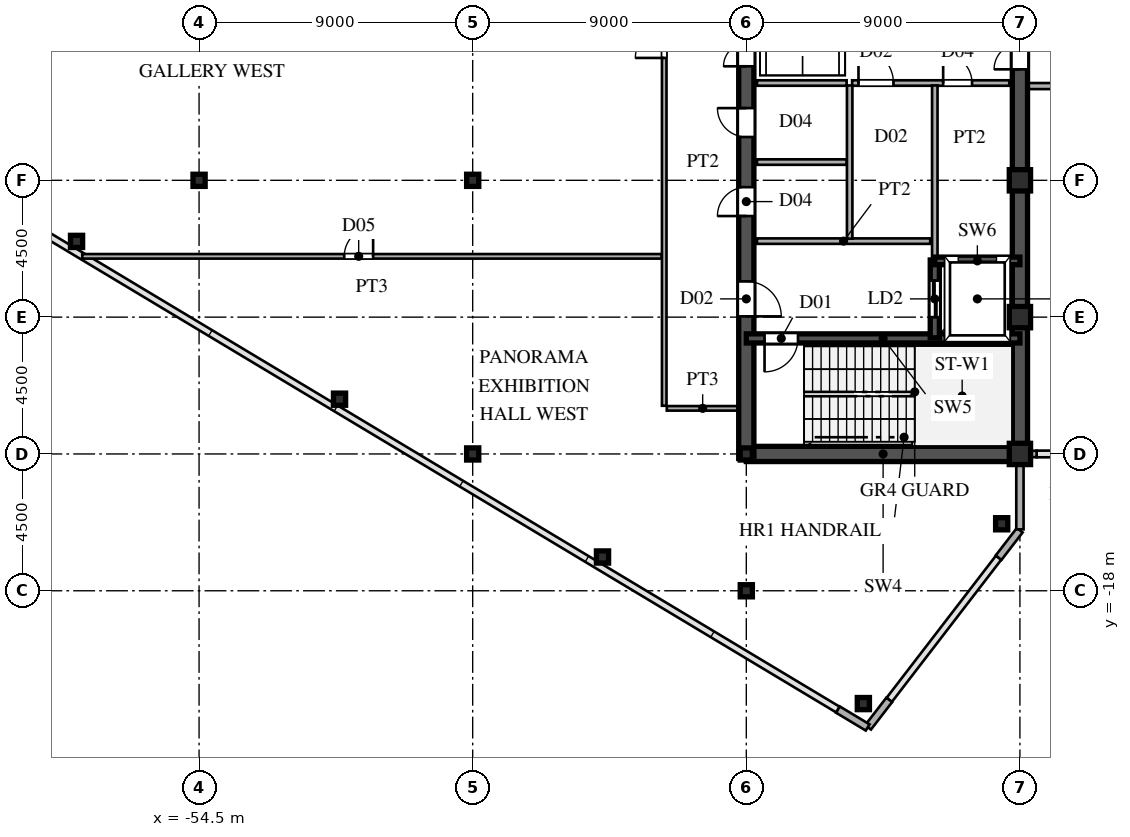
"""IFC4 building model, lengths in metres.
Left out: names, types, materials, properties, quantities, classifications, styles, units other than length and angle.
Written with IfcOpenShell. Run it as: python <this file> out.ifc"""

import sys

from ifc_helpers import new_model, si_unit, direction, frame, frame_2d, origin, origin_2d, place, context, subcontext, project, spatial, rectangle, hollow_rectangle, i_section, extrude, source, transform, mapped, element, fill, save


model = new_model("IFC4")
c1 = context("Model", 3, precision=1e-05, world=origin(), true_north=direction((0.0, 1.0)))
c2 = subcontext(c1, "Body", "Model", "MODEL_VIEW")
j1 = project(units=[si_unit("LENGTHUNIT", "METRE"), si_unit("PLANEANGLEUNIT", "RADIAN")], contexts=[c1])
p1 = place(None, origin())
s1 = spatial("IfcSite", under=j1, at=p1, CompositionType="ELEMENT")
p2 = place(p1, origin())
s2 = spatial("IfcBuilding", under=s1, at=p2, CompositionType="ELEMENT")
p3 = place(p2, frame((0.0, 0.0, 269.4)))
s3 = spatial("IfcBuildingStorey", under=s2, at=p3, CompositionType="ELEMENT", Elevation=269.4)
m1 = source(origin(), c2, "Body", "SweptSolid", [
    extrude(hollow_rectangle(XDim=0.7, YDim=0.7, WallThickness=0.03, at=origin_2d()), origin(), (0.0, 0.0, 1.0), 4.8),
])
for number, where, z_axis, x_axis in (
    (1, (-27.5, -13.5, 0.0), (0.0, 0.0, 1.0), (1.0, 0.0, 0.0)),
    (2, (-27.5, -9.0, 0.0), (0.0, 0.0, 1.0), (1.0, 0.0, 0.0)),
    (3, (-27.5, -4.5, 0.0), (0.0, 0.0, 1.0), (1.0, 0.0, 0.0)),
):
    element("IfcColumn", number, at=place(p3, frame(where, z_axis=z_axis, x_axis=x_axis)), inside=s3, PredefinedType="COLUMN", context=c2, shape_type="MappedRepresentation", body=[
        mapped(m1, transform((0.0, 0.0, 0.0), scale=1.0)),
    ])
m2 = source(origin(), c2, "Body", "SweptSolid", [
    extrude(i_section(OverallWidth=0.4, OverallDepth=0.4, WebThickness=0.013, FlangeThickness=0.021, at=origin_2d()), origin(), (0.0, 0.0, 1.0), 4.8),
])
for number, where, z_axis, x_axis in (
    (4, (-36.5, -18.0, 0.0), (0.0, 0.0, 1.0), (1.0, 0.0, 0.0)),
    (5, (-36.5, -13.5, 0.0), (0.0, 0.0, 1.0), (1.0, 0.0, 0.0)),
    (6, (-45.5, -13.5, 0.0), (0.0, 0.0, 1.0), (1.0, 0.0, 0.0)),
    (7, (-45.5, -4.5, 0.0), (0.0, 0.0, 1.0), (1.0, 0.0, 0.0)),
    (8, (-54.5, -4.5, 0.0), (0.0, 0.0, 1.0), (1.0, 0.0, 0.0)),
):
    element("IfcColumn", number, at=place(p3, frame(where, z_axis=z_axis, x_axis=x_axis)), inside=s3, PredefinedType="COLUMN", context=c2, shape_type="MappedRepresentation", body=[
        mapped(m2, transform((0.0, 0.0, 0.0), scale=1.0)),
    ])
m3 = source(origin(), c2, "Body", "SweptSolid", [
    extrude(hollow_rectangle(XDim=0.4, YDim=0.4, WallThickness=0.016, at=origin_2d()), origin(), (0.0, 0.0, 1.0), 4.8),
])
for number, where, z_axis, x_axis in (
    (9, (-28.1, -15.796, 0.0), (0.0, 0.0, 1.0), (1.0, 0.0, 0.0)),
    (10, (-32.65, -21.71, 0.0), (0.0, 0.0, 1.0), (1.0, 0.0, 0.0)),
    (11, (-41.23, -16.889, 0.0), (0.0, 0.0, 1.0), (1.0, 0.0, 0.0)),
    (12, (-49.88, -11.699, 0.0), (0.0, 0.0, 1.0), (1.0, 0.0, 0.0)),
    (13, (-58.53, -6.509, 0.0), (0.0, 0.0, 1.0), (1.0, 0.0, 0.0)),
):
    element("IfcColumn", number, at=place(p3, frame(where, z_axis=z_axis, x_axis=x_axis)), inside=s3, PredefinedType="COLUMN", context=c2, shape_type="MappedRepresentation", body=[
        mapped(m3, transform((0.0, 0.0, 0.0), scale=1.0)),
    ])
p4 = place(p3, frame((-27.5, -15.98, 0.0), z_axis=(0.0, 0.0, 1.0), x_axis=(0.0, 1.0, 0.0)))
e14 = element("IfcWall", 14, at=p4, inside=s3, PredefinedType="SOLIDWALL", context=c2, shape_type="SweptSolid", body=[
    extrude(rectangle(XDim=1.605, YDim=0.24, at=frame_2d((0.803, 0.0))), origin(), (0.0, 0.0, 1.0), 4.54),
])
p5 = place(p3, frame((-27.5, -14.375, 0.0), z_axis=(0.0, 0.0, 1.0), x_axis=(0.0, 1.0, 0.0)))
e15 = element("IfcWall", 15, at=p5, inside=s3, PredefinedType="SOLIDWALL", context=c2, shape_type="SweptSolid", body=[
    extrude(rectangle(XDim=0.62, YDim=0.24, at=frame_2d((0.31, 0.0))), origin(), (0.0, 0.0, 1.0), 4.04),
])
for number, where, z_axis, x_axis in (
    (16, (-33.486, -21.908, 0.0), (0.0, 0.0, 1.0), (0.857, -0.515, 0.0)),
    (17, (-32.494, -22.492, 0.0), (0.0, 0.0, 1.0), (0.61, 0.793, 0.0)),
    (18, (-28.201, -16.912, 0.0), (0.0, 0.0, 1.0), (0.61, 0.793, 0.0)),
):
    element("IfcWall", number, at=place(p3, frame(where, z_axis=z_axis, x_axis=x_axis)), inside=s3, PredefinedType="SOLIDWALL", context=c2, shape_type="SweptSolid", body=[
        extrude(rectangle(XDim=1.14, YDim=0.24, at=frame_2d((0.57, 0.0))), origin(), (0.0, 0.0, 1.0), 4.54),
    ])
p6 = place(p3, frame((-27.49, -13.5, 0.0), z_axis=(0.0, 0.0, 1.0), x_axis=(1.0, 0.0, 0.0)))
e19 = element("IfcWall", 19, at=p6, inside=s3, PredefinedType="SOLIDWALL", context=c2, shape_type="SweptSolid", body=[
    extrude(rectangle(XDim=0.54, YDim=0.21, at=frame_2d((0.27, 0.0))), origin(), (0.0, 0.0, 1.0), 4.04),
])
p7 = place(p3, frame((-27.5, -13.5, 0.0), z_axis=(0.0, 0.0, 1.0), x_axis=(0.0, 1.0, 0.0)))
e20 = element("IfcWall", 20, at=p7, inside=s3, PredefinedType="SHEAR", context=c2, shape_type="SweptSolid", body=[
    extrude(rectangle(XDim=12.2, YDim=0.5, at=frame_2d((6.1, 0.0))), origin(), (0.0, 0.0, 1.0), 4.54),
])
p8 = place(p3, frame((-27.5, -1.3, 0.0), z_axis=(0.0, 0.0, 1.0), x_axis=(0.0, 1.0, 0.0)))
e21 = element("IfcWall", 21, at=p8, inside=s3, PredefinedType="SHEAR", context=c2, shape_type="SweptSolid", body=[
    extrude(rectangle(XDim=2.6, YDim=0.5, at=frame_2d((1.3, 0.0))), origin(), (0.0, 0.0, 1.0), 4.54),
])
p9 = place(p8, frame((0.45, 0.0, 0.0)))
e22 = element("IfcOpeningElement", 22, at=p9, cuts=e21, PredefinedType="OPENING", context=c2, shape_type="SweptSolid", body=[
    extrude(rectangle(XDim=1.7, YDim=2.35, at=frame_2d((0.85, 1.175))), frame((0.0, 0.26, 0.0), z_axis=(0.0, -1.0, 0.0), x_axis=(1.0, 0.0, 0.0)), (0.0, 0.0, 1.0), 0.52),
])
p10 = place(p3, frame((-36.5, -13.5, 0.0), z_axis=(0.0, 0.0, 1.0), x_axis=(1.0, 0.0, 0.0)))
e23 = element("IfcWall", 23, at=p10, inside=s3, PredefinedType="SHEAR", context=c2, shape_type="SweptSolid", body=[
    extrude(rectangle(XDim=9.0, YDim=0.5, at=frame_2d((4.5, 0.0))), origin(), (0.0, 0.0, 1.0), 4.54),
])
p11 = place(p3, frame((-36.5, -13.65, 0.0), z_axis=(0.0, 0.0, 1.0), x_axis=(0.0, 1.0, 0.0)))
e24 = element("IfcWall", 24, at=p11, inside=s3, PredefinedType="SHEAR", context=c2, shape_type="SweptSolid", body=[
    extrude(rectangle(XDim=7.15, YDim=0.5, at=frame_2d((3.575, 0.0))), origin(), (0.0, 0.0, 1.0), 4.54),
])
p12 = place(p11, frame((4.675, 0.0, 0.0)))
e25 = element("IfcOpeningElement", 25, at=p12, cuts=e24, PredefinedType="OPENING", context=c2, shape_type="SweptSolid", body=[
    extrude(rectangle(XDim=1.15, YDim=2.2, at=frame_2d((0.575, 1.1))), frame((0.0, 0.26, 0.0), z_axis=(0.0, -1.0, 0.0), x_axis=(1.0, 0.0, 0.0)), (0.0, 0.0, 1.0), 0.52),
])
p13 = place(p3, frame((-36.5, -1.3, 0.0), z_axis=(0.0, 0.0, 1.0), x_axis=(0.0, 1.0, 0.0)))
e26 = element("IfcWall", 26, at=p13, inside=s3, PredefinedType="SHEAR", context=c2, shape_type="SweptSolid", body=[
    extrude(rectangle(XDim=2.6, YDim=0.5, at=frame_2d((1.3, 0.0))), origin(), (0.0, 0.0, 1.0), 4.54),
])
p14 = place(p13, frame((0.55, 0.0, 0.0)))
e27 = element("IfcOpeningElement", 27, at=p14, cuts=e26, PredefinedType="OPENING", context=c2, shape_type="SweptSolid", body=[
    extrude(rectangle(XDim=1.5, YDim=2.3, at=frame_2d((0.75, 1.15))), frame((0.0, 0.26, 0.0), z_axis=(0.0, -1.0, 0.0), x_axis=(1.0, 0.0, 0.0)), (0.0, 0.0, 1.0), 0.52),
])
p15 = place(p3, frame((-36.5, -6.5, 0.0), z_axis=(0.0, 0.0, 1.0), x_axis=(0.0, 1.0, 0.0)))
e28 = element("IfcWall", 28, at=p15, inside=s3, PredefinedType="SHEAR", context=c2, shape_type="SweptSolid", body=[
    extrude(rectangle(XDim=2.6, YDim=0.5, at=frame_2d((1.3, 0.0))), origin(), (0.0, 0.0, 1.0), 4.54),
])
p16 = place(p15, frame((0.825, 0.0, 0.0)))
e29 = element("IfcOpeningElement", 29, at=p16, cuts=e28, PredefinedType="OPENING", context=c2, shape_type="SweptSolid", body=[
    extrude(rectangle(XDim=0.95, YDim=2.15, at=frame_2d((0.475, 1.075))), frame((0.0, 0.26, 0.0), z_axis=(0.0, -1.0, 0.0), x_axis=(1.0, 0.0, 0.0)), (0.0, 0.0, 1.0), 0.52),
])
p17 = place(p3, frame((-36.5, -3.9, 0.0), z_axis=(0.0, 0.0, 1.0), x_axis=(0.0, 1.0, 0.0)))
e30 = element("IfcWall", 30, at=p17, inside=s3, PredefinedType="SHEAR", context=c2, shape_type="SweptSolid", body=[
    extrude(rectangle(XDim=2.6, YDim=0.5, at=frame_2d((1.3, 0.0))), origin(), (0.0, 0.0, 1.0), 4.54),
])
p18 = place(p17, frame((0.825, 0.0, 0.0)))
e31 = element("IfcOpeningElement", 31, at=p18, cuts=e30, PredefinedType="OPENING", context=c2, shape_type="SweptSolid", body=[
    extrude(rectangle(XDim=0.95, YDim=2.15, at=frame_2d((0.475, 1.075))), frame((0.0, 0.26, 0.0), z_axis=(0.0, -1.0, 0.0), x_axis=(1.0, 0.0, 0.0)), (0.0, 0.0, 1.0), 0.52),
])
p19 = place(p3, frame((-36.5, -9.7, 0.0), z_axis=(0.0, 0.0, 1.0), x_axis=(1.0, 0.0, 0.0)))
e32 = element("IfcWall", 32, at=p19, inside=s3, PredefinedType="SHEAR", context=c2, shape_type="SweptSolid", body=[
    extrude(rectangle(XDim=9.0, YDim=0.3, at=frame_2d((4.5, 0.0))), origin(), (0.0, 0.0, 1.0), 4.54),
])
p20 = place(p19, frame((0.6, 0.0, 0.0)))
e33 = element("IfcOpeningElement", 33, at=p20, cuts=e32, PredefinedType="OPENING", context=c2, shape_type="SweptSolid", body=[
    extrude(rectangle(XDim=1.1, YDim=2.2, at=frame_2d((0.55, 1.1))), frame((0.0, 0.16, 0.0), z_axis=(0.0, -1.0, 0.0), x_axis=(1.0, 0.0, 0.0)), (0.0, 0.0, 1.0), 0.32),
])
p21 = place(p3, frame((-30.3, -7.15, 0.0), z_axis=(0.0, 0.0, 1.0), x_axis=(1.0, 0.0, 0.0)))
e34 = element("IfcWall", 34, at=p21, inside=s3, PredefinedType="SHEAR", context=c2, shape_type="SweptSolid", body=[
    extrude(rectangle(XDim=2.8, YDim=0.25, at=frame_2d((1.4, 0.0))), origin(), (0.0, 0.0, 1.0), 4.54),
])
p22 = place(p3, frame((-30.3, -9.68, 0.0), z_axis=(0.0, 0.0, 1.0), x_axis=(0.0, 1.0, 0.0)))
e35 = element("IfcWall", 35, at=p22, inside=s3, PredefinedType="SHEAR", context=c2, shape_type="SweptSolid", body=[
    extrude(rectangle(XDim=2.56, YDim=0.3, at=frame_2d((1.28, 0.0))), origin(), (0.0, 0.0, 1.0), 4.54),
])
p23 = place(p22, frame((0.68, 0.0, 0.0)))
e36 = element("IfcOpeningElement", 36, at=p23, cuts=e35, PredefinedType="OPENING", context=c2, shape_type="SweptSolid", body=[
    extrude(rectangle(XDim=1.2, YDim=2.25, at=frame_2d((0.6, 1.125))), frame((0.0, 0.16, 0.0), z_axis=(0.0, -1.0, 0.0), x_axis=(1.0, 0.0, 0.0)), (0.0, 0.0, 1.0), 0.32),
])
p24 = place(p3, frame((-36.15, -6.5, 0.0), z_axis=(0.0, 0.0, 1.0), x_axis=(1.0, 0.0, 0.0)))
e37 = element("IfcWall", 37, at=p24, inside=s3, PredefinedType="PARTITIONING", context=c2, shape_type="SweptSolid", body=[
    extrude(rectangle(XDim=5.7, YDim=0.18, at=frame_2d((2.85, 0.0))), origin(), (0.0, 0.0, 1.0), 4.54),
])
p25 = place(p3, frame((-33.1, -6.42, 0.0), z_axis=(0.0, 0.0, 1.0), x_axis=(0.0, 1.0, 0.0)))
e38 = element("IfcWall", 38, at=p25, inside=s3, PredefinedType="PARTITIONING", context=c2, shape_type="SweptSolid", body=[
    extrude(rectangle(XDim=5.04, YDim=0.18, at=frame_2d((2.52, 0.0))), origin(), (0.0, 0.0, 1.0), 4.54),
])
p26 = place(p3, frame((-30.3, -1.3, 0.0), z_axis=(0.0, 0.0, 1.0), x_axis=(1.0, 0.0, 0.0)))
e39 = element("IfcWall", 39, at=p26, inside=s3, PredefinedType="PARTITIONING", context=c2, shape_type="SweptSolid", body=[
    extrude(rectangle(XDim=2.45, YDim=0.18, at=frame_2d((1.225, 0.0))), origin(), (0.0, 0.0, 1.0), 4.54),
])
p27 = place(p26, frame((0.275, 0.0, 0.0)))
e40 = element("IfcOpeningElement", 40, at=p27, cuts=e39, PredefinedType="OPENING", context=c2, shape_type="SweptSolid", body=[
    extrude(rectangle(XDim=0.95, YDim=2.15, at=frame_2d((0.475, 1.075))), frame((0.0, 0.1, 0.0), z_axis=(0.0, -1.0, 0.0), x_axis=(1.0, 0.0, 0.0)), (0.0, 0.0, 1.0), 0.2),
])
p28 = place(p3, frame((-33.02, -1.3, 0.0), z_axis=(0.0, 0.0, 1.0), x_axis=(1.0, 0.0, 0.0)))
e41 = element("IfcWall", 41, at=p28, inside=s3, PredefinedType="PARTITIONING", context=c2, shape_type="SweptSolid", body=[
    extrude(rectangle(XDim=2.72, YDim=0.18, at=frame_2d((1.36, 0.0))), origin(), (0.0, 0.0, 1.0), 4.54),
])
p29 = place(p28, frame((0.21, 0.0, 0.0)))
e42 = element("IfcOpeningElement", 42, at=p29, cuts=e41, PredefinedType="OPENING", context=c2, shape_type="SweptSolid", body=[
    extrude(rectangle(XDim=1.15, YDim=2.2, at=frame_2d((0.575, 1.1))), frame((0.0, 0.1, 0.0), z_axis=(0.0, -1.0, 0.0), x_axis=(1.0, 0.0, 0.0)), (0.0, 0.0, 1.0), 0.2),
])
p30 = place(p3, frame((-30.3, -7.12, 0.0), z_axis=(0.0, 0.0, 1.0), x_axis=(0.0, 1.0, 0.0)))
e43 = element("IfcWall", 43, at=p30, inside=s3, PredefinedType="PARTITIONING", context=c2, shape_type="SweptSolid", body=[
    extrude(rectangle(XDim=5.74, YDim=0.18, at=frame_2d((2.87, 0.0))), origin(), (0.0, 0.0, 1.0), 4.54),
])
for number, where, z_axis, x_axis in (
    (44, (-36.15, -1.3, 0.0), (0.0, 0.0, 1.0), (1.0, 0.0, 0.0)),
    (45, (-36.15, -3.9, 0.0), (0.0, 0.0, 1.0), (1.0, 0.0, 0.0)),
):
    element("IfcWall", number, at=place(p3, frame(where, z_axis=z_axis, x_axis=x_axis)), inside=s3, PredefinedType="PARTITIONING", context=c2, shape_type="SweptSolid", body=[
        extrude(rectangle(XDim=2.95, YDim=0.18, at=frame_2d((1.475, 0.0))), origin(), (0.0, 0.0, 1.0), 4.54),
    ])
p31 = place(p3, frame((-39.115, -12.0, 0.0), z_axis=(0.0, 0.0, 1.0), x_axis=(1.0, 0.0, 0.0)))
e46 = element("IfcWall", 46, at=p31, inside=s3, PredefinedType="PARTITIONING", context=c2, shape_type="SweptSolid", body=[
    extrude(rectangle(XDim=2.36, YDim=0.15, at=frame_2d((1.18, 0.0))), origin(), (0.0, 0.0, 1.0), 4.54),
])
p32 = place(p3, frame((-58.343, -7.0, 0.0), z_axis=(0.0, 0.0, 1.0), x_axis=(1.0, 0.0, 0.0)))
e47 = element("IfcWall", 47, at=p32, inside=s3, PredefinedType="PARTITIONING", context=c2, shape_type="SweptSolid", body=[
    extrude(rectangle(XDim=19.058, YDim=0.15, at=frame_2d((9.529, 0.0))), origin(), (0.0, 0.0, 1.0), 4.54),
])
p33 = place(p32, frame((8.618, 0.0, 0.0)))
e48 = element("IfcOpeningElement", 48, at=p33, cuts=e47, PredefinedType="OPENING", context=c2, shape_type="SweptSolid", body=[
    extrude(rectangle(XDim=0.95, YDim=2.15, at=frame_2d((0.475, 1.075))), frame((0.0, 0.085, 0.0), z_axis=(0.0, -1.0, 0.0), x_axis=(1.0, 0.0, 0.0)), (0.0, 0.0, 1.0), 0.17),
])
p34 = place(p3, frame((-27.245, -1.4, 0.0), z_axis=(0.0, 0.0, 1.0), x_axis=(1.0, 0.0, 0.0)))
e49 = element("IfcWall", 49, at=p34, inside=s3, PredefinedType="PARTITIONING", context=c2, shape_type="SweptSolid", body=[
    extrude(rectangle(XDim=54.49, YDim=0.2, at=frame_2d((27.245, 0.0))), origin(), (0.0, 0.0, 1.0), 4.54),
])
p35 = place(p34, frame((17.67, 0.0, 0.0)))
e50 = element("IfcOpeningElement", 50, at=p35, cuts=e49, PredefinedType="OPENING", context=c2, shape_type="SweptSolid", body=[
    extrude(rectangle(XDim=1.15, YDim=2.2, at=frame_2d((0.575, 1.1))), frame((0.0, 0.11, 0.0), z_axis=(0.0, -1.0, 0.0), x_axis=(1.0, 0.0, 0.0)), (0.0, 0.0, 1.0), 0.22),
])
p36 = place(p34, frame((35.17, 0.0, 0.0)))
e51 = element("IfcOpeningElement", 51, at=p36, cuts=e49, PredefinedType="OPENING", context=c2, shape_type="SweptSolid", body=[
    extrude(rectangle(XDim=1.15, YDim=2.2, at=frame_2d((0.575, 1.1))), frame((0.0, 0.11, 0.0), z_axis=(0.0, -1.0, 0.0), x_axis=(1.0, 0.0, 0.0)), (0.0, 0.0, 1.0), 0.22),
])
p37 = place(p3, frame((-39.2, -11.915, 0.0), z_axis=(0.0, 0.0, 1.0), x_axis=(0.0, 1.0, 0.0)))
e52 = element("IfcWall", 52, at=p37, inside=s3, PredefinedType="PARTITIONING", context=c2, shape_type="SweptSolid", body=[
    extrude(rectangle(XDim=23.83, YDim=0.15, at=frame_2d((11.915, 0.0))), origin(), (0.0, 0.0, 1.0), 4.54),
])
p38 = place(p37, frame((11.44, 0.0, 0.0)))
e53 = element("IfcOpeningElement", 53, at=p38, cuts=e52, PredefinedType="OPENING", context=c2, shape_type="SweptSolid", body=[
    extrude(rectangle(XDim=0.95, YDim=2.15, at=frame_2d((0.475, 1.075))), frame((0.0, 0.085, 0.0), z_axis=(0.0, -1.0, 0.0), x_axis=(1.0, 0.0, 0.0)), (0.0, 0.0, 1.0), 0.17),
])
m4 = source(origin(), c2, "Body", "SweptSolid", [
    extrude(rectangle(XDim=1.7, YDim=2.35, at=frame_2d((0.85, 1.175))), frame((0.0, 0.025, 0.0), z_axis=(0.0, -1.0, 0.0), x_axis=(1.0, 0.0, 0.0)), (0.0, 0.0, 1.0), 0.05),
])
p39 = place(p9, origin())
e54 = element("IfcDoor", 54, at=p39, inside=s3, OperationType="DOUBLE_SWING_LEFT", PredefinedType="DOOR", context=c2, shape_type="MappedRepresentation", body=[
    mapped(m4, transform((0.0, 0.0, 0.0), scale=1.0)),
])
fill(e22, e54)
m5 = source(origin(), c2, "Body", "SweptSolid", [
    extrude(rectangle(XDim=1.15, YDim=2.2, at=frame_2d((0.575, 1.1))), frame((0.0, 0.025, 0.0), z_axis=(0.0, -1.0, 0.0), x_axis=(1.0, 0.0, 0.0)), (0.0, 0.0, 1.0), 0.05),
])
p40 = place(p12, frame((1.15, 0.0, 0.0), z_axis=(0.0, 0.0, 1.0), x_axis=(-1.0, 0.0, 0.0)))
e55 = element("IfcDoor", 55, at=p40, inside=s3, OperationType="SINGLE_SWING_LEFT", PredefinedType="DOOR", context=c2, shape_type="MappedRepresentation", body=[
    mapped(m5, transform((0.0, 0.0, 0.0), scale=1.0)),
])
fill(e25, e55)
m6 = source(origin(), c2, "Body", "SweptSolid", [
    extrude(rectangle(XDim=1.5, YDim=2.3, at=frame_2d((0.75, 1.15))), frame((0.0, 0.025, 0.0), z_axis=(0.0, -1.0, 0.0), x_axis=(1.0, 0.0, 0.0)), (0.0, 0.0, 1.0), 0.05),
])
p41 = place(p14, origin())
e56 = element("IfcDoor", 56, at=p41, inside=s3, OperationType="DOUBLE_SWING_LEFT", PredefinedType="DOOR", context=c2, shape_type="MappedRepresentation", body=[
    mapped(m6, transform((0.0, 0.0, 0.0), scale=1.0)),
])
fill(e27, e56)
m7 = source(origin(), c2, "Body", "SweptSolid", [
    extrude(rectangle(XDim=0.95, YDim=2.15, at=frame_2d((0.475, 1.075))), frame((0.0, 0.025, 0.0), z_axis=(0.0, -1.0, 0.0), x_axis=(1.0, 0.0, 0.0)), (0.0, 0.0, 1.0), 0.05),
])
p42 = place(p16, origin())
e57 = element("IfcDoor", 57, at=p42, inside=s3, OperationType="SINGLE_SWING_LEFT", PredefinedType="DOOR", context=c2, shape_type="MappedRepresentation", body=[
    mapped(m7, transform((0.0, 0.0, 0.0), scale=1.0)),
])
fill(e29, e57)
p43 = place(p18, origin())
e58 = element("IfcDoor", 58, at=p43, inside=s3, OperationType="SINGLE_SWING_RIGHT", PredefinedType="DOOR", context=c2, shape_type="MappedRepresentation", body=[
    mapped(m7, transform((0.0, 0.0, 0.0), scale=1.0)),
])
fill(e31, e58)
m8 = source(origin(), c2, "Body", "SweptSolid", [
    extrude(rectangle(XDim=1.1, YDim=2.2, at=frame_2d((0.55, 1.1))), frame((0.0, 0.025, 0.0), z_axis=(0.0, -1.0, 0.0), x_axis=(1.0, 0.0, 0.0)), (0.0, 0.0, 1.0), 0.05),
])
p44 = place(p20, frame((1.1, 0.0, 0.0), z_axis=(0.0, 0.0, 1.0), x_axis=(-1.0, 0.0, 0.0)))
e59 = element("IfcDoor", 59, at=p44, inside=s3, OperationType="SINGLE_SWING_LEFT", PredefinedType="DOOR", context=c2, shape_type="MappedRepresentation", body=[
    mapped(m8, transform((0.0, 0.0, 0.0), scale=1.0)),
])
fill(e33, e59)
m9 = source(origin(), c2, "Body", "SweptSolid", [
    extrude(rectangle(XDim=1.2, YDim=2.25, at=frame_2d((0.6, 1.125))), frame((0.0, 0.025, 0.0), z_axis=(0.0, -1.0, 0.0), x_axis=(1.0, 0.0, 0.0)), (0.0, 0.0, 1.0), 0.05),
])
p45 = place(p23, origin())
e60 = element("IfcDoor", 60, at=p45, inside=s3, OperationType="DOUBLE_DOOR_SLIDING", PredefinedType="DOOR", context=c2, shape_type="MappedRepresentation", body=[
    mapped(m9, transform((0.0, 0.0, 0.0), scale=1.0)),
])
fill(e36, e60)
p46 = place(p27, origin())
e61 = element("IfcDoor", 61, at=p46, inside=s3, OperationType="SINGLE_SWING_LEFT", PredefinedType="DOOR", context=c2, shape_type="MappedRepresentation", body=[
    mapped(m7, transform((0.0, 0.0, 0.0), scale=1.0)),
])
fill(e40, e61)
p47 = place(p29, origin())
e62 = element("IfcDoor", 62, at=p47, inside=s3, OperationType="SINGLE_SWING_LEFT", PredefinedType="DOOR", context=c2, shape_type="MappedRepresentation", body=[
    mapped(m5, transform((0.0, 0.0, 0.0), scale=1.0)),
])
fill(e42, e62)
m10 = source(origin(), c2, "Body", "SweptSolid", [
    extrude(rectangle(XDim=0.95, YDim=2.15, at=frame_2d((0.475, 1.075))), frame((0.0, 0.025, 0.0), z_axis=(0.0, -1.0, 0.0), x_axis=(1.0, 0.0, 0.0)), (0.0, 0.0, 1.0), 0.05),
])
p48 = place(p33, origin())
e63 = element("IfcDoor", 63, at=p48, inside=s3, OperationType="SINGLE_SWING_RIGHT", PredefinedType="DOOR", context=c2, shape_type="MappedRepresentation", body=[
    mapped(m10, transform((0.0, 0.0, 0.0), scale=1.0)),
])
fill(e48, e63)
p49 = place(p38, origin())
e64 = element("IfcDoor", 64, at=p49, inside=s3, OperationType="SINGLE_SWING_LEFT", PredefinedType="DOOR", context=c2, shape_type="MappedRepresentation", body=[
    mapped(m10, transform((0.0, 0.0, 0.0), scale=1.0)),
])
fill(e53, e64)
save(model, sys.argv[1])
